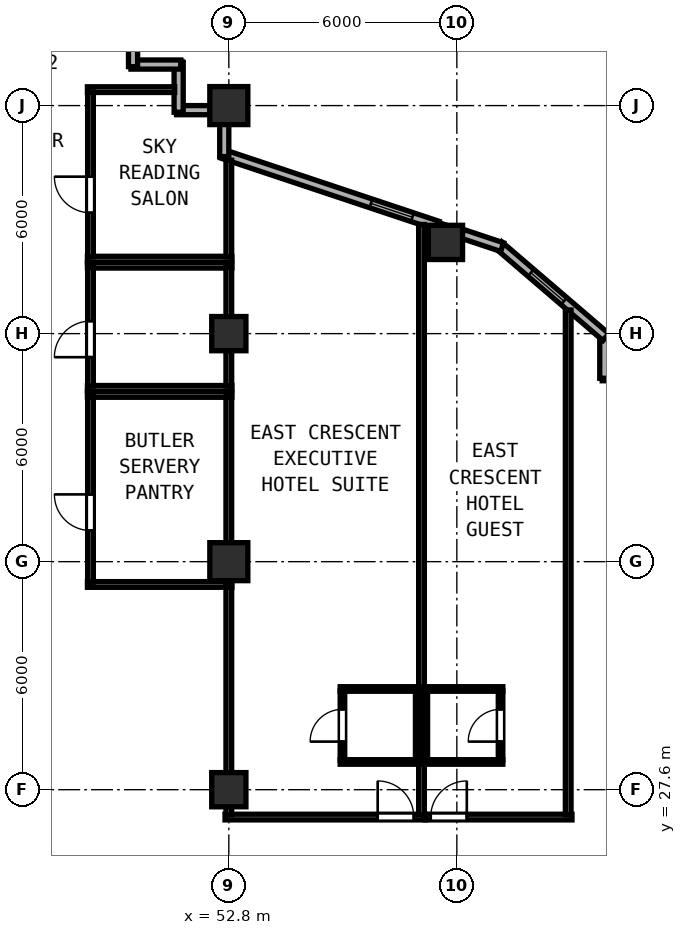
"""IFC4 building model, lengths in metres.
Left out: names, types, materials, properties, quantities, classifications, styles, units other than length and angle.
Written with IfcOpenShell. Run it as: python <this file> out.ifc"""

import sys

from ifc_helpers import new_model, si_unit, direction, frame, frame_2d, origin, origin_2d, place, context, subcontext, project, spatial, rectangle, hollow_rectangle, extrude, element, fill, save


model = new_model("IFC4")
c1 = context("Model", 3, precision=1e-05, world=origin(), true_north=direction((0.0, 1.0)))
c2 = subcontext(c1, "Body", "Model", "MODEL_VIEW")
j1 = project(units=[si_unit("LENGTHUNIT", "METRE"), si_unit("PLANEANGLEUNIT", "RADIAN")], contexts=[c1])
p1 = place(None, origin())
s1 = spatial("IfcSite", under=j1, at=p1, CompositionType="ELEMENT")
p2 = place(p1, origin())
s2 = spatial("IfcBuilding", under=s1, at=p2, CompositionType="ELEMENT")
p3 = place(p2, frame((0.0, 0.0, 144.8)))
s3 = spatial("IfcBuildingStorey", under=s2, at=p3, CompositionType="ELEMENT", Elevation=144.8)
for number, where, z_axis, x_axis in (
    (1, (52.8, 33.6, 0.0), (0.0, 0.0, 1.0), (1.0, 0.0, 0.0)),
    (2, (52.8, 45.6, 0.0), (0.0, 0.0, 1.0), (1.0, 0.0, 0.0)),
):
    element("IfcColumn", number, at=place(p3, frame(where, z_axis=z_axis, x_axis=x_axis)), inside=s3, PredefinedType="COLUMN", context=c2, shape_type="SweptSolid", body=[
        extrude(hollow_rectangle(XDim=1.0, YDim=1.0, WallThickness=0.038, at=origin_2d()), origin(), (0.0, 0.0, 1.0), 3.8),
    ])
for number, where, z_axis, x_axis in (
    (3, (52.8, 27.6, 0.0), (0.0, 0.0, 1.0), (1.0, 0.0, 0.0)),
    (4, (52.8, 39.6, 0.0), (0.0, 0.0, 1.0), (1.0, 0.0, 0.0)),
    (5, (58.5, 42.0, 0.0), (0.0, 0.0, 1.0), (1.0, 0.0, 0.0)),
):
    element("IfcColumn", number, at=place(p3, frame(where, z_axis=z_axis, x_axis=x_axis)), inside=s3, PredefinedType="COLUMN", context=c2, shape_type="SweptSolid", body=[
        extrude(hollow_rectangle(XDim=0.9, YDim=0.9, WallThickness=0.034, at=origin_2d()), origin(), (0.0, 0.0, 1.0), 3.8),
    ])
p4 = place(p3, frame((63.735, 38.48, 0.0), z_axis=(0.0, 0.0, 1.0), x_axis=(-1.0, 0.0, 0.0)))
e6 = element("IfcWall", 6, at=p4, inside=s3, PredefinedType="SOLIDWALL", context=c2, shape_type="SweptSolid", body=[
    extrude(rectangle(XDim=1.11, YDim=0.24, at=frame_2d((0.555, 0.0))), origin(), (0.0, 0.0, 1.0), 3.6),
])
p5 = place(p3, frame((62.68, 38.425, 0.0), z_axis=(0.0, 0.0, 1.0), x_axis=(0.0, 1.0, 0.0)))
e7 = element("IfcWall", 7, at=p5, inside=s3, PredefinedType="SOLIDWALL", context=c2, shape_type="SweptSolid", body=[
    extrude(rectangle(XDim=1.175, YDim=0.24, at=frame_2d((0.587, 0.0))), origin(), (0.0, 0.0, 1.0), 3.6),
])
p6 = place(p3, frame((62.722, 39.509, 0.0), z_axis=(0.0, 0.0, 1.0), x_axis=(-0.759247334792, 0.650802185469, 0.0)))
e8 = element("IfcWall", 8, at=p6, inside=s3, PredefinedType="SOLIDWALL", context=c2, shape_type="SweptSolid", body=[
    extrude(rectangle(XDim=3.719, YDim=0.24, at=frame_2d((1.86, 0.0))), origin(), (0.0, 0.0, 1.0), 3.6),
])
p7 = place(p6, frame((1.451, 0.0, 0.85)))
e9 = element("IfcOpeningElement", 9, at=p7, cuts=e8, PredefinedType="OPENING", context=c2, shape_type="SweptSolid", body=[
    extrude(rectangle(XDim=1.15, YDim=1.8, at=frame_2d((0.575, 0.9))), frame((0.0, 0.13, 0.0), z_axis=(0.0, -1.0, 0.0), x_axis=(1.0, 0.0, 0.0)), (0.0, 0.0, 1.0), 0.26),
])
p8 = place(p3, frame((59.992, 41.876, 0.0), z_axis=(0.0, 0.0, 1.0), x_axis=(-0.948661238983, 0.316293935527, 0.0)))
e10 = element("IfcWall", 10, at=p8, inside=s3, PredefinedType="SOLIDWALL", context=c2, shape_type="SweptSolid", body=[
    extrude(rectangle(XDim=1.107, YDim=0.24, at=frame_2d((0.553, 0.0))), origin(), (0.0, 0.0, 1.0), 3.6),
])
p9 = place(p3, frame((58.295, 42.442, 0.0), z_axis=(0.0, 0.0, 1.0), x_axis=(-0.948687385027, 0.316215504823, 0.0)))
e11 = element("IfcWall", 11, at=p9, inside=s3, PredefinedType="SOLIDWALL", context=c2, shape_type="SweptSolid", body=[
    extrude(rectangle(XDim=5.973, YDim=0.24, at=frame_2d((2.987, 0.0))), origin(), (0.0, 0.0, 1.0), 3.145),
])
p10 = place(p9, frame((0.7, 0.0, 0.85)))
e12 = element("IfcOpeningElement", 12, at=p10, cuts=e11, PredefinedType="OPENING", context=c2, shape_type="SweptSolid", body=[
    extrude(rectangle(XDim=1.15, YDim=1.8, at=frame_2d((0.575, 0.9))), frame((0.0, 0.13, 0.0), z_axis=(0.0, -1.0, 0.0), x_axis=(1.0, 0.0, 0.0)), (0.0, 0.0, 1.0), 0.26),
])
p11 = place(p3, frame((52.68, 44.259, 0.0), z_axis=(0.0, 0.0, 1.0), x_axis=(0.0, 1.0, 0.0)))
e13 = element("IfcWall", 13, at=p11, inside=s3, PredefinedType="SOLIDWALL", context=c2, shape_type="SweptSolid", body=[
    extrude(rectangle(XDim=0.849, YDim=0.24, at=frame_2d((0.425, 0.0))), origin(), (0.0, 0.0, 1.0), 3.145),
])
p12 = place(p3, frame((52.308, 45.48, 0.0), z_axis=(0.0, 0.0, 1.0), x_axis=(-1.0, 0.0, 0.0)))
e14 = element("IfcWall", 14, at=p12, inside=s3, PredefinedType="SOLIDWALL", context=c2, shape_type="SweptSolid", body=[
    extrude(rectangle(XDim=0.883, YDim=0.24, at=frame_2d((0.441, 0.0))), origin(), (0.0, 0.0, 1.0), 3.6),
])
p13 = place(p3, frame((51.48, 45.425, 0.0), z_axis=(0.0, 0.0, 1.0), x_axis=(0.0, 1.0, 0.0)))
e15 = element("IfcWall", 15, at=p13, inside=s3, PredefinedType="SOLIDWALL", context=c2, shape_type="SweptSolid", body=[
    extrude(rectangle(XDim=1.31, YDim=0.24, at=frame_2d((0.655, 0.0))), origin(), (0.0, 0.0, 1.0), 3.6),
])
p14 = place(p3, frame((51.535, 46.68, 0.0), z_axis=(0.0, 0.0, 1.0), x_axis=(-1.0, 0.0, 0.0)))
e16 = element("IfcWall", 16, at=p14, inside=s3, PredefinedType="SOLIDWALL", context=c2, shape_type="SweptSolid", body=[
    extrude(rectangle(XDim=1.31, YDim=0.24, at=frame_2d((0.655, 0.0))), origin(), (0.0, 0.0, 1.0), 3.6),
])
p15 = place(p3, frame((50.28, 46.625, 0.0), z_axis=(0.0, 0.0, 1.0), x_axis=(0.0, 1.0, 0.0)))
e17 = element("IfcWall", 17, at=p15, inside=s3, PredefinedType="SOLIDWALL", context=c2, shape_type="SweptSolid", body=[
    extrude(rectangle(XDim=1.54, YDim=0.24, at=frame_2d((0.77, 0.0))), origin(), (0.0, 0.0, 1.0), 3.6),
])
for number, where, z_axis, x_axis in (
    (18, (49.08, 38.0, 0.0), (0.0, 0.0, 1.0), (1.0, 0.0, 0.0)),
    (19, (49.08, 33.0, 0.0), (0.0, 0.0, 1.0), (1.0, 0.0, 0.0)),
):
    element("IfcWall", number, at=place(p3, frame(where, z_axis=z_axis, x_axis=x_axis)), inside=s3, PredefinedType="PARTITIONING", context=c2, shape_type="SweptSolid", body=[
        extrude(rectangle(XDim=3.8, YDim=0.15, at=frame_2d((1.9, 0.0))), origin(), (0.0, 0.0, 1.0), 3.6),
    ])
p16 = place(p3, frame((49.16, 33.06, 0.0), z_axis=(0.0, 0.0, 1.0), x_axis=(0.0, 1.0, 0.0)))
e20 = element("IfcWall", 20, at=p16, inside=s3, PredefinedType="PARTITIONING", context=c2, shape_type="SweptSolid", body=[
    extrude(rectangle(XDim=4.88, YDim=0.15, at=frame_2d((2.44, 0.0))), origin(), (0.0, 0.0, 1.0), 3.6),
])
p17 = place(p16, frame((1.36, 0.0, 0.0)))
e21 = element("IfcOpeningElement", 21, at=p17, cuts=e20, PredefinedType="OPENING", context=c2, shape_type="SweptSolid", body=[
    extrude(rectangle(XDim=0.95, YDim=2.12, at=frame_2d((0.475, 1.06))), frame((0.0, 0.085, 0.0), z_axis=(0.0, -1.0, 0.0), x_axis=(1.0, 0.0, 0.0)), (0.0, 0.0, 1.0), 0.17),
])
p18 = place(p3, frame((52.8, 33.06, 0.0), z_axis=(0.0, 0.0, 1.0), x_axis=(0.0, 1.0, 0.0)))
e22 = element("IfcWall", 22, at=p18, inside=s3, PredefinedType="PARTITIONING", context=c2, shape_type="SweptSolid", body=[
    extrude(rectangle(XDim=4.88, YDim=0.15, at=frame_2d((2.44, 0.0))), origin(), (0.0, 0.0, 1.0), 3.145),
])
for number, where, z_axis, x_axis in (
    (23, (49.08, 41.4, 0.0), (0.0, 0.0, 1.0), (1.0, 0.0, 0.0)),
    (24, (49.08, 38.16, 0.0), (0.0, 0.0, 1.0), (1.0, 0.0, 0.0)),
):
    element("IfcWall", number, at=place(p3, frame(where, z_axis=z_axis, x_axis=x_axis)), inside=s3, PredefinedType="PARTITIONING", context=c2, shape_type="SweptSolid", body=[
        extrude(rectangle(XDim=3.8, YDim=0.15, at=frame_2d((1.9, 0.0))), origin(), (0.0, 0.0, 1.0), 3.6),
    ])
p19 = place(p3, frame((49.16, 38.22, 0.0), z_axis=(0.0, 0.0, 1.0), x_axis=(0.0, 1.0, 0.0)))
e25 = element("IfcWall", 25, at=p19, inside=s3, PredefinedType="PARTITIONING", context=c2, shape_type="SweptSolid", body=[
    extrude(rectangle(XDim=3.12, YDim=0.15, at=frame_2d((1.56, 0.0))), origin(), (0.0, 0.0, 1.0), 3.6),
])
p20 = place(p19, frame((0.76, 0.0, 0.0)))
e26 = element("IfcOpeningElement", 26, at=p20, cuts=e25, PredefinedType="OPENING", context=c2, shape_type="SweptSolid", body=[
    extrude(rectangle(XDim=0.95, YDim=2.12, at=frame_2d((0.475, 1.06))), frame((0.0, 0.085, 0.0), z_axis=(0.0, -1.0, 0.0), x_axis=(1.0, 0.0, 0.0)), (0.0, 0.0, 1.0), 0.17),
])
p21 = place(p3, frame((52.8, 38.22, 0.0), z_axis=(0.0, 0.0, 1.0), x_axis=(0.0, 1.0, 0.0)))
e27 = element("IfcWall", 27, at=p21, inside=s3, PredefinedType="PARTITIONING", context=c2, shape_type="SweptSolid", body=[
    extrude(rectangle(XDim=3.12, YDim=0.15, at=frame_2d((1.56, 0.0))), origin(), (0.0, 0.0, 1.0), 3.145),
])
p22 = place(p3, frame((49.08, 46.02, 0.0), z_axis=(0.0, 0.0, 1.0), x_axis=(1.0, 0.0, 0.0)))
e28 = element("IfcWall", 28, at=p22, inside=s3, PredefinedType="PARTITIONING", context=c2, shape_type="SweptSolid", body=[
    extrude(rectangle(XDim=2.295, YDim=0.15, at=frame_2d((1.147, 0.0))), origin(), (0.0, 0.0, 1.0), 3.6),
])
p23 = place(p3, frame((49.08, 41.56, 0.0), z_axis=(0.0, 0.0, 1.0), x_axis=(1.0, 0.0, 0.0)))
e29 = element("IfcWall", 29, at=p23, inside=s3, PredefinedType="PARTITIONING", context=c2, shape_type="SweptSolid", body=[
    extrude(rectangle(XDim=3.8, YDim=0.15, at=frame_2d((1.9, 0.0))), origin(), (0.0, 0.0, 1.0), 3.6),
])
p24 = place(p3, frame((49.16, 41.62, 0.0), z_axis=(0.0, 0.0, 1.0), x_axis=(0.0, 1.0, 0.0)))
e30 = element("IfcWall", 30, at=p24, inside=s3, PredefinedType="PARTITIONING", context=c2, shape_type="SweptSolid", body=[
    extrude(rectangle(XDim=4.34, YDim=0.15, at=frame_2d((2.17, 0.0))), origin(), (0.0, 0.0, 1.0), 3.6),
])
p25 = place(p24, frame((1.16, 0.0, 0.0)))
e31 = element("IfcOpeningElement", 31, at=p25, cuts=e30, PredefinedType="OPENING", context=c2, shape_type="SweptSolid", body=[
    extrude(rectangle(XDim=0.95, YDim=2.12, at=frame_2d((0.475, 1.06))), frame((0.0, 0.085, 0.0), z_axis=(0.0, -1.0, 0.0), x_axis=(1.0, 0.0, 0.0)), (0.0, 0.0, 1.0), 0.17),
])
p26 = place(p3, frame((52.8, 41.62, 0.0), z_axis=(0.0, 0.0, 1.0), x_axis=(0.0, 1.0, 0.0)))
e32 = element("IfcWall", 32, at=p26, inside=s3, PredefinedType="PARTITIONING", context=c2, shape_type="SweptSolid", body=[
    extrude(rectangle(XDim=2.543, YDim=0.15, at=frame_2d((1.271, 0.0))), origin(), (0.0, 0.0, 1.0), 3.145),
])
p27 = place(p3, frame((52.7, 26.88, 0.0), z_axis=(0.0, 0.0, 1.0), x_axis=(1.0, 0.0, 0.0)))
e33 = element("IfcWall", 33, at=p27, inside=s3, PredefinedType="PARTITIONING", context=c2, shape_type="SweptSolid", body=[
    extrude(rectangle(XDim=5.27, YDim=0.15, at=frame_2d((2.635, 0.0))), origin(), (0.0, 0.0, 1.0), 3.6),
])
p28 = place(p27, frame((4.017, 0.0, 0.0)))
e34 = element("IfcOpeningElement", 34, at=p28, cuts=e33, PredefinedType="OPENING", context=c2, shape_type="SweptSolid", body=[
    extrude(rectangle(XDim=0.95, YDim=2.18, at=frame_2d((0.475, 1.09))), frame((0.0, 0.085, 0.0), z_axis=(0.0, -1.0, 0.0), x_axis=(1.0, 0.0, 0.0)), (0.0, 0.0, 1.0), 0.17),
])
p29 = place(p3, frame((52.8, 26.94, 0.0), z_axis=(0.0, 0.0, 1.0), x_axis=(0.0, 1.0, 0.0)))
e35 = element("IfcWall", 35, at=p29, inside=s3, PredefinedType="PARTITIONING", context=c2, shape_type="SweptSolid", body=[
    extrude(rectangle(XDim=6.0, YDim=0.15, at=frame_2d((3.0, 0.0))), origin(), (0.0, 0.0, 1.0), 3.145),
])
p30 = place(p3, frame((57.87, 26.94, 0.0), z_axis=(0.0, 0.0, 1.0), x_axis=(0.0, 1.0, 0.0)))
e36 = element("IfcWall", 36, at=p30, inside=s3, PredefinedType="PARTITIONING", context=c2, shape_type="SweptSolid", body=[
    extrude(rectangle(XDim=15.533, YDim=0.15, at=frame_2d((7.767, 0.0))), origin(), (0.0, 0.0, 1.0), 3.6),
])
for number, where, z_axis, x_axis in (
    (37, (55.73, 30.25, 0.0), (0.0, 0.0, 1.0), (1.0, 0.0, 0.0)),
    (38, (55.73, 28.33, 0.0), (0.0, 0.0, 1.0), (1.0, 0.0, 0.0)),
):
    element("IfcWall", number, at=place(p3, frame(where, z_axis=z_axis, x_axis=x_axis)), inside=s3, PredefinedType="PARTITIONING", context=c2, shape_type="SweptSolid", body=[
        extrude(rectangle(XDim=2.08, YDim=0.12, at=frame_2d((1.04, 0.0))), origin(), (0.0, 0.0, 1.0), 3.6),
    ])
p31 = place(p3, frame((55.79, 28.375, 0.0), z_axis=(0.0, 0.0, 1.0), x_axis=(0.0, 1.0, 0.0)))
e39 = element("IfcWall", 39, at=p31, inside=s3, PredefinedType="PARTITIONING", context=c2, shape_type="SweptSolid", body=[
    extrude(rectangle(XDim=1.83, YDim=0.12, at=frame_2d((0.915, 0.0))), origin(), (0.0, 0.0, 1.0), 3.6),
])
p32 = place(p31, frame((1.34, 0.0, 0.0), z_axis=(0.0, 0.0, 1.0), x_axis=(-1.0, 0.0, 0.0)))
e40 = element("IfcOpeningElement", 40, at=p32, cuts=e39, PredefinedType="OPENING", context=c2, shape_type="SweptSolid", body=[
    extrude(rectangle(XDim=0.85, YDim=2.1, at=frame_2d((0.425, 1.05))), frame((0.0, 0.07, 0.0), z_axis=(0.0, -1.0, 0.0), x_axis=(1.0, 0.0, 0.0)), (0.0, 0.0, 1.0), 0.14),
])
p33 = place(p3, frame((57.77, 28.375, 0.0), z_axis=(0.0, 0.0, 1.0), x_axis=(0.0, 1.0, 0.0)))
e41 = element("IfcWall", 41, at=p33, inside=s3, PredefinedType="PARTITIONING", context=c2, shape_type="SweptSolid", body=[
    extrude(rectangle(XDim=1.83, YDim=0.12, at=frame_2d((0.915, 0.0))), origin(), (0.0, 0.0, 1.0), 3.6),
])
p34 = place(p3, frame((57.972, 26.88, 0.0), z_axis=(0.0, 0.0, 1.0), x_axis=(1.0, 0.0, 0.0)))
e42 = element("IfcWall", 42, at=p34, inside=s3, PredefinedType="PARTITIONING", context=c2, shape_type="SweptSolid", body=[
    extrude(rectangle(XDim=3.858, YDim=0.15, at=frame_2d((1.929, 0.0))), origin(), (0.0, 0.0, 1.0), 3.6),
])
p35 = place(p34, frame((0.14, 0.0, 0.0)))
e43 = element("IfcOpeningElement", 43, at=p35, cuts=e42, PredefinedType="OPENING", context=c2, shape_type="SweptSolid", body=[
    extrude(rectangle(XDim=0.95, YDim=2.15, at=frame_2d((0.475, 1.075))), frame((0.0, 0.085, 0.0), z_axis=(0.0, -1.0, 0.0), x_axis=(1.0, 0.0, 0.0)), (0.0, 0.0, 1.0), 0.17),
])
p36 = place(p3, frame((61.73, 26.94, 0.0), z_axis=(0.0, 0.0, 1.0), x_axis=(0.0, 1.0, 0.0)))
e44 = element("IfcWall", 44, at=p36, inside=s3, PredefinedType="PARTITIONING", context=c2, shape_type="SweptSolid", body=[
    extrude(rectangle(XDim=13.281, YDim=0.15, at=frame_2d((6.64, 0.0))), origin(), (0.0, 0.0, 1.0), 3.6),
])
for number, where, z_axis, x_axis in (
    (45, (57.93, 30.25, 0.0), (0.0, 0.0, 1.0), (1.0, 0.0, 0.0)),
    (46, (57.93, 28.33, 0.0), (0.0, 0.0, 1.0), (1.0, 0.0, 0.0)),
):
    element("IfcWall", number, at=place(p3, frame(where, z_axis=z_axis, x_axis=x_axis)), inside=s3, PredefinedType="PARTITIONING", context=c2, shape_type="SweptSolid", body=[
        extrude(rectangle(XDim=2.08, YDim=0.12, at=frame_2d((1.04, 0.0))), origin(), (0.0, 0.0, 1.0), 3.6),
    ])
p37 = place(p3, frame((57.97, 28.375, 0.0), z_axis=(0.0, 0.0, 1.0), x_axis=(0.0, 1.0, 0.0)))
e47 = element("IfcWall", 47, at=p37, inside=s3, PredefinedType="PARTITIONING", context=c2, shape_type="SweptSolid", body=[
    extrude(rectangle(XDim=1.83, YDim=0.12, at=frame_2d((0.915, 0.0))), origin(), (0.0, 0.0, 1.0), 3.6),
])
p38 = place(p3, frame((59.95, 28.375, 0.0), z_axis=(0.0, 0.0, 1.0), x_axis=(0.0, 1.0, 0.0)))
e48 = element("IfcWall", 48, at=p38, inside=s3, PredefinedType="PARTITIONING", context=c2, shape_type="SweptSolid", body=[
    extrude(rectangle(XDim=1.83, YDim=0.12, at=frame_2d((0.915, 0.0))), origin(), (0.0, 0.0, 1.0), 3.6),
])
p39 = place(p38, frame((0.49, 0.0, 0.0)))
e49 = element("IfcOpeningElement", 49, at=p39, cuts=e48, PredefinedType="OPENING", context=c2, shape_type="SweptSolid", body=[
    extrude(rectangle(XDim=0.85, YDim=2.1, at=frame_2d((0.425, 1.05))), frame((0.0, 0.07, 0.0), z_axis=(0.0, -1.0, 0.0), x_axis=(1.0, 0.0, 0.0)), (0.0, 0.0, 1.0), 0.14),
])
p40 = place(p7, origin())
e50 = element("IfcWindow", 50, at=p40, inside=s3, PartitioningType="SINGLE_PANEL", PredefinedType="WINDOW", context=c2, shape_type="SweptSolid", body=[
    extrude(rectangle(XDim=1.15, YDim=1.8, at=frame_2d((0.575, 0.9))), frame((0.0, 0.03, 0.0), z_axis=(0.0, -1.0, 0.0), x_axis=(1.0, 0.0, 0.0)), (0.0, 0.0, 1.0), 0.06),
])
fill(e9, e50)
p41 = place(p10, origin())
e51 = element("IfcWindow", 51, at=p41, inside=s3, PartitioningType="SINGLE_PANEL", PredefinedType="WINDOW", context=c2, shape_type="SweptSolid", body=[
    extrude(rectangle(XDim=1.15, YDim=1.8, at=frame_2d((0.575, 0.9))), frame((0.0, 0.03, 0.0), z_axis=(0.0, -1.0, 0.0), x_axis=(1.0, 0.0, 0.0)), (0.0, 0.0, 1.0), 0.06),
])
fill(e12, e51)
p42 = place(p17, origin())
e52 = element("IfcDoor", 52, at=p42, inside=s3, OperationType="SINGLE_SWING_RIGHT", PredefinedType="DOOR", context=c2, shape_type="SweptSolid", body=[
    extrude(rectangle(XDim=0.95, YDim=2.12, at=frame_2d((0.475, 1.06))), frame((0.0, 0.025, 0.0), z_axis=(0.0, -1.0, 0.0), x_axis=(1.0, 0.0, 0.0)), (0.0, 0.0, 1.0), 0.05),
])
fill(e21, e52)
p43 = place(p20, origin())
e53 = element("IfcDoor", 53, at=p43, inside=s3, OperationType="SINGLE_SWING_LEFT", PredefinedType="DOOR", context=c2, shape_type="SweptSolid", body=[
    extrude(rectangle(XDim=0.95, YDim=2.12, at=frame_2d((0.475, 1.06))), frame((0.0, 0.025, 0.0), z_axis=(0.0, -1.0, 0.0), x_axis=(1.0, 0.0, 0.0)), (0.0, 0.0, 1.0), 0.05),
])
fill(e26, e53)
p44 = place(p25, origin())
e54 = element("IfcDoor", 54, at=p44, inside=s3, OperationType="SINGLE_SWING_RIGHT", PredefinedType="DOOR", context=c2, shape_type="SweptSolid", body=[
    extrude(rectangle(XDim=0.95, YDim=2.12, at=frame_2d((0.475, 1.06))), frame((0.0, 0.025, 0.0), z_axis=(0.0, -1.0, 0.0), x_axis=(1.0, 0.0, 0.0)), (0.0, 0.0, 1.0), 0.05),
])
fill(e31, e54)
p45 = place(p28, origin())
e55 = element("IfcDoor", 55, at=p45, inside=s3, OperationType="SINGLE_SWING_LEFT", PredefinedType="DOOR", context=c2, shape_type="SweptSolid", body=[
    extrude(rectangle(XDim=0.95, YDim=2.18, at=frame_2d((0.475, 1.09))), frame((0.0, 0.025, 0.0), z_axis=(0.0, -1.0, 0.0), x_axis=(1.0, 0.0, 0.0)), (0.0, 0.0, 1.0), 0.05),
])
fill(e34, e55)
p46 = place(p32, origin())
e56 = element("IfcDoor", 56, at=p46, inside=s3, OperationType="SINGLE_SWING_RIGHT", PredefinedType="DOOR", context=c2, shape_type="SweptSolid", body=[
    extrude(rectangle(XDim=0.85, YDim=2.1, at=frame_2d((0.425, 1.05))), frame((0.0, 0.025, 0.0), z_axis=(0.0, -1.0, 0.0), x_axis=(1.0, 0.0, 0.0)), (0.0, 0.0, 1.0), 0.05),
])
fill(e40, e56)
p47 = place(p35, origin())
e57 = element("IfcDoor", 57, at=p47, inside=s3, OperationType="SINGLE_SWING_RIGHT", PredefinedType="DOOR", context=c2, shape_type="SweptSolid", body=[
    extrude(rectangle(XDim=0.95, YDim=2.15, at=frame_2d((0.475, 1.075))), frame((0.0, 0.025, 0.0), z_axis=(0.0, -1.0, 0.0), x_axis=(1.0, 0.0, 0.0)), (0.0, 0.0, 1.0), 0.05),
])
fill(e43, e57)
p48 = place(p39, origin())
e58 = element("IfcDoor", 58, at=p48, inside=s3, OperationType="SINGLE_SWING_LEFT", PredefinedType="DOOR", context=c2, shape_type="SweptSolid", body=[
    extrude(rectangle(XDim=0.85, YDim=2.1, at=frame_2d((0.425, 1.05))), frame((0.0, 0.025, 0.0), z_axis=(0.0, -1.0, 0.0), x_axis=(1.0, 0.0, 0.0)), (0.0, 0.0, 1.0), 0.05),
])
fill(e49, e58)
save(model, sys.argv[1])
